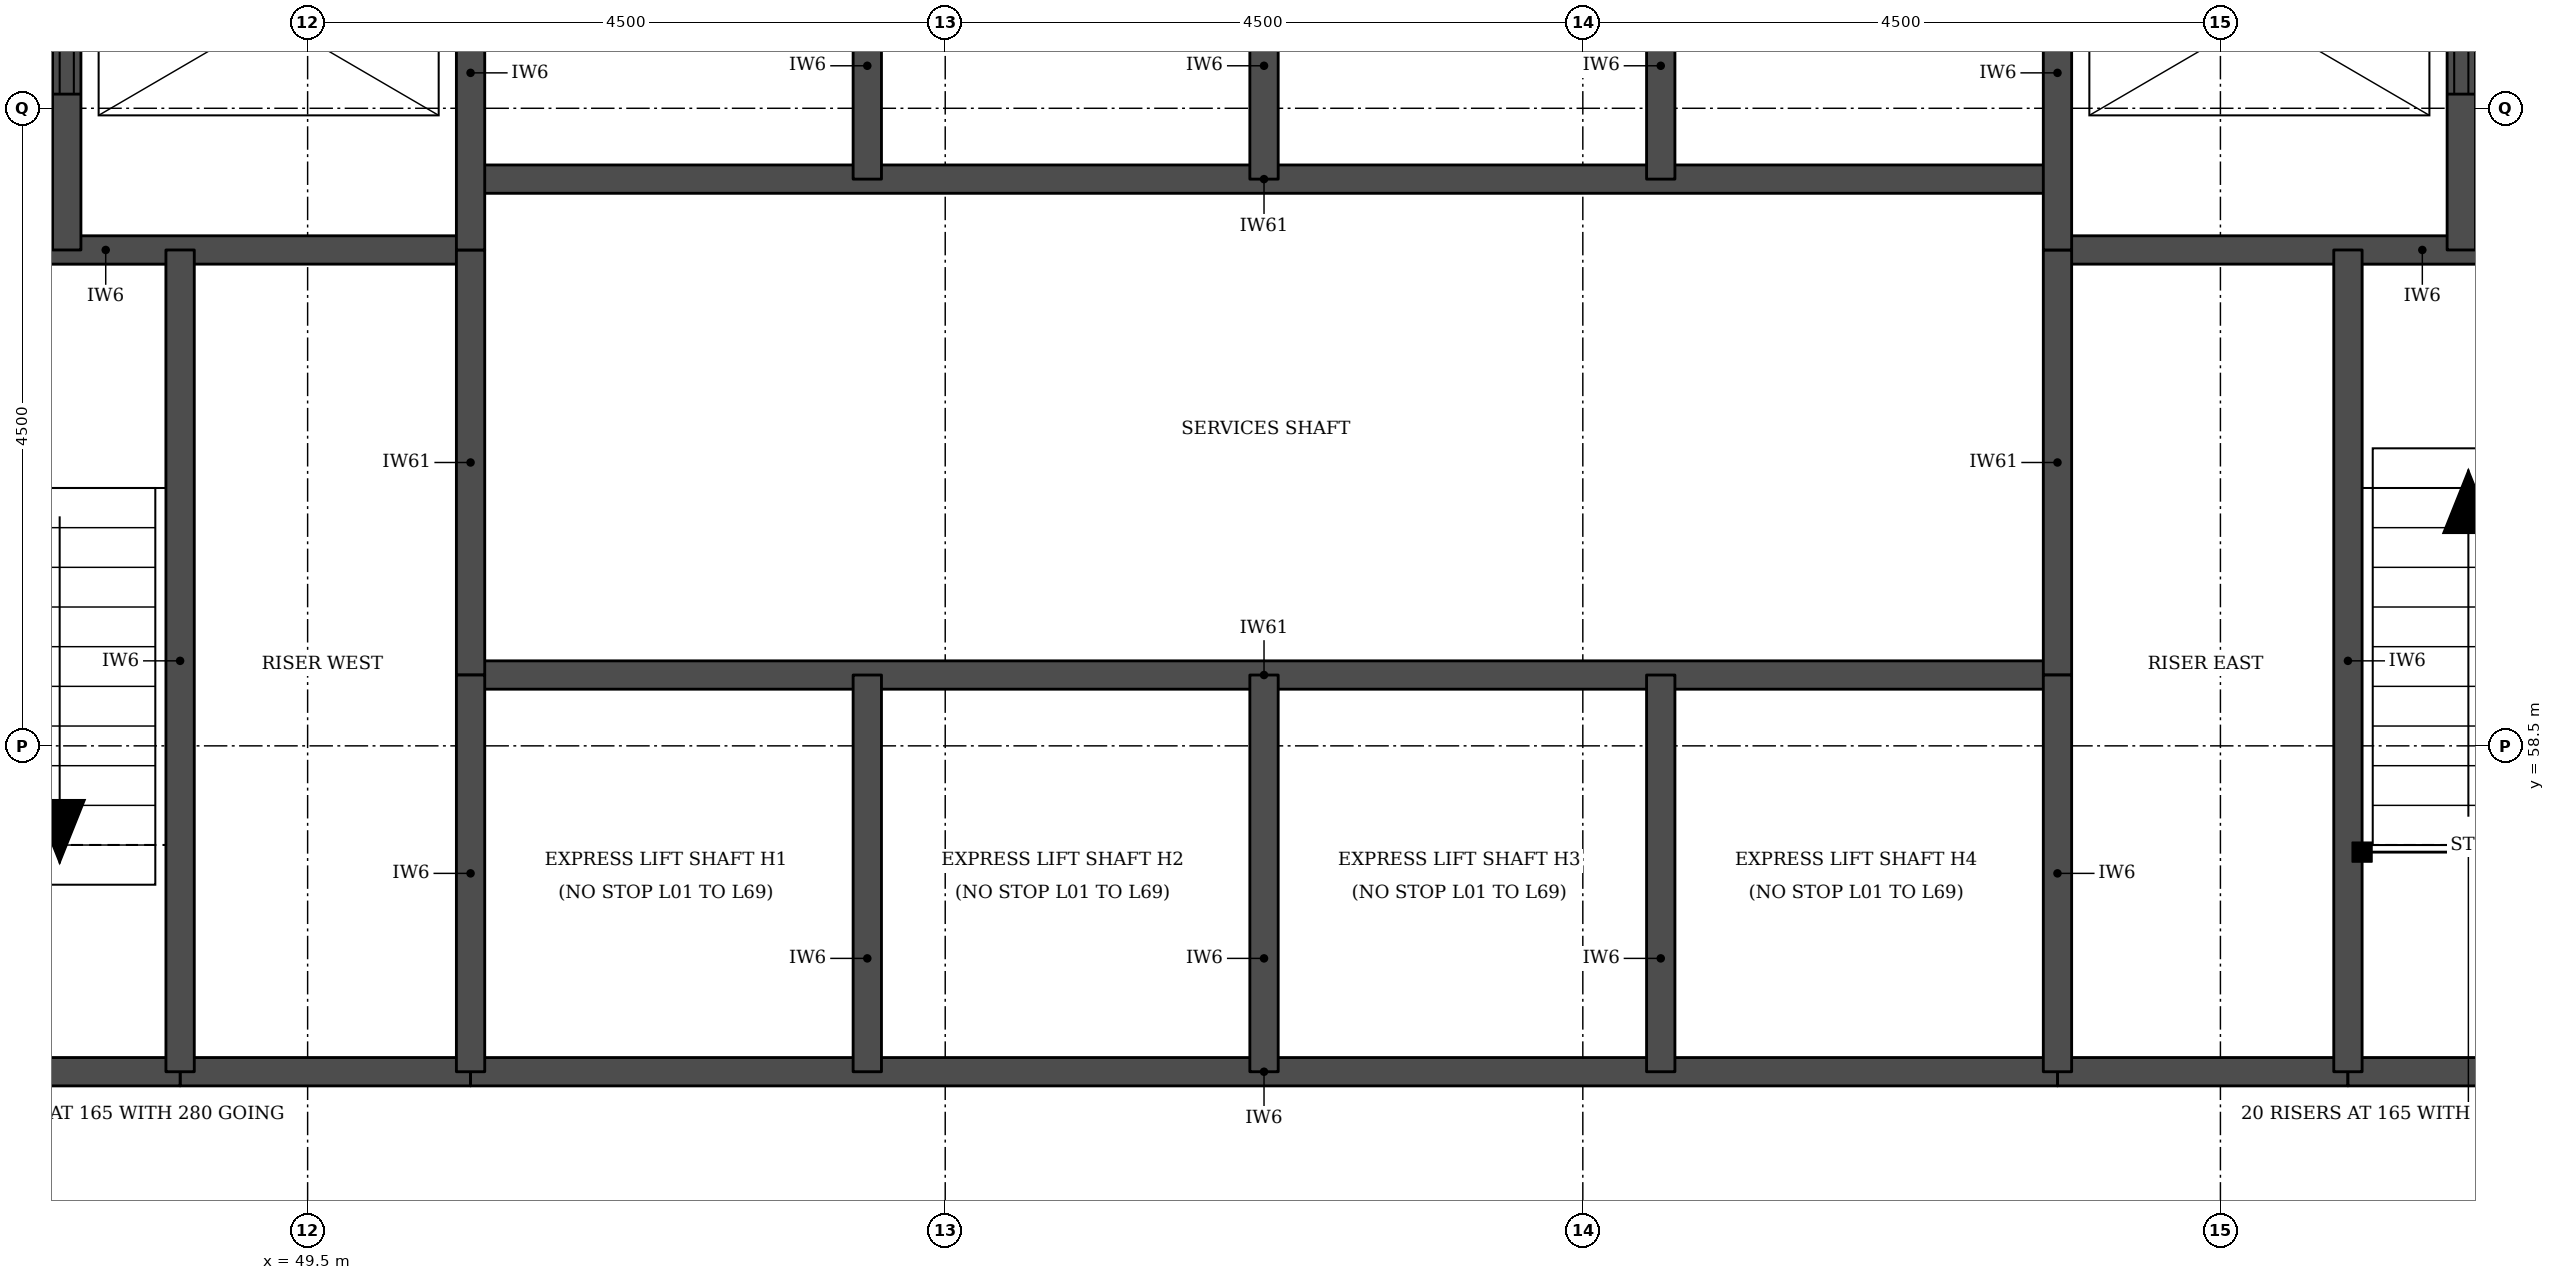
"""IFC4 building model, lengths in metres.
Left out: names, types, materials, properties, quantities, classifications, styles, units other than length and angle.
Written with IfcOpenShell. Run it as: python <this file> out.ifc"""

import sys

from ifc_helpers import new_model, si_unit, direction, frame, frame_2d, origin, place, context, subcontext, project, spatial, rectangle, extrude, element, fill, save


model = new_model("IFC4")
c1 = context("Model", 3, precision=1e-05, world=origin(), true_north=direction((0.0, 1.0)))
c2 = subcontext(c1, "Body", "Model", "MODEL_VIEW")
j1 = project(units=[si_unit("LENGTHUNIT", "METRE"), si_unit("PLANEANGLEUNIT", "RADIAN")], contexts=[c1])
p1 = place(None, origin())
s1 = spatial("IfcSite", under=j1, at=p1, CompositionType="ELEMENT")
p2 = place(p1, origin())
s2 = spatial("IfcBuilding", under=s1, at=p2, CompositionType="ELEMENT")
p3 = place(p2, frame((0.0, 0.0, 56.1)))
s3 = spatial("IfcBuildingStorey", under=s2, at=p3, CompositionType="ELEMENT", Elevation=56.1)
for number, where, z_axis, x_axis in (
    (1, (48.6, 56.2, 0.0), (0.0, 0.0, 1.0), (1.0, 0.0, 0.0)),
    (2, (61.85, 56.2, 0.0), (0.0, 0.0, 1.0), (1.0, 0.0, 0.0)),
):
    element("IfcWall", number, at=place(p3, frame(where, z_axis=z_axis, x_axis=x_axis)), inside=s3, PredefinedType="SOLIDWALL", context=c2, shape_type="SweptSolid", body=[
        extrude(rectangle(XDim=2.05, YDim=0.2, at=frame_2d((1.025, 0.0))), origin(), (0.0, 0.0, 1.0), 3.08),
    ])
p4 = place(p3, frame((45.5, 56.2, 0.0), z_axis=(0.0, 0.0, 1.0), x_axis=(1.0, 0.0, 0.0)))
e3 = element("IfcWall", 3, at=p4, inside=s3, PredefinedType="SOLIDWALL", context=c2, shape_type="SweptSolid", body=[
    extrude(rectangle(XDim=3.1, YDim=0.2, at=frame_2d((1.55, 0.0))), origin(), (0.0, 0.0, 1.0), 3.08),
])
p5 = place(p3, frame((50.65, 56.2, 0.0), z_axis=(0.0, 0.0, 1.0), x_axis=(1.0, 0.0, 0.0)))
e4 = element("IfcWall", 4, at=p5, inside=s3, PredefinedType="SOLIDWALL", context=c2, shape_type="SweptSolid", body=[
    extrude(rectangle(XDim=11.2, YDim=0.2, at=frame_2d((5.6, 0.0))), origin(), (0.0, 0.0, 1.0), 3.08),
])
p6 = place(p3, frame((63.9, 56.2, 0.0), z_axis=(0.0, 0.0, 1.0), x_axis=(1.0, 0.0, 0.0)))
e5 = element("IfcWall", 5, at=p6, inside=s3, PredefinedType="SOLIDWALL", context=c2, shape_type="SweptSolid", body=[
    extrude(rectangle(XDim=3.1, YDim=0.2, at=frame_2d((1.55, 0.0))), origin(), (0.0, 0.0, 1.0), 3.08),
])
p7 = place(p3, frame((50.65, 59.0, 0.0), z_axis=(0.0, 0.0, 1.0), x_axis=(1.0, 0.0, 0.0)))
e6 = element("IfcWall", 6, at=p7, inside=s3, PredefinedType="SOLIDWALL", context=c2, shape_type="SweptSolid", body=[
    extrude(rectangle(XDim=11.2, YDim=0.2, at=frame_2d((5.6, 0.0))), origin(), (0.0, 0.0, 1.0), 3.3),
])
for number, where, z_axis, x_axis in (
    (7, (45.5, 62.0, 0.0), (0.0, 0.0, 1.0), (1.0, 0.0, 0.0)),
    (8, (61.85, 62.0, 0.0), (0.0, 0.0, 1.0), (1.0, 0.0, 0.0)),
):
    element("IfcWall", number, at=place(p3, frame(where, z_axis=z_axis, x_axis=x_axis)), inside=s3, PredefinedType="SOLIDWALL", context=c2, shape_type="SweptSolid", body=[
        extrude(rectangle(XDim=5.15, YDim=0.2, at=frame_2d((2.575, 0.0))), origin(), (0.0, 0.0, 1.0), 3.08),
    ])
p8 = place(p3, frame((50.65, 62.5, 0.0), z_axis=(0.0, 0.0, 1.0), x_axis=(1.0, 0.0, 0.0)))
e9 = element("IfcWall", 9, at=p8, inside=s3, PredefinedType="SOLIDWALL", context=c2, shape_type="SweptSolid", body=[
    extrude(rectangle(XDim=11.2, YDim=0.2, at=frame_2d((5.6, 0.0))), origin(), (0.0, 0.0, 1.0), 3.3),
])
p9 = place(p3, frame((47.8, 62.0, 0.0), z_axis=(0.0, 0.0, 1.0), x_axis=(0.0, 1.0, 0.0)))
e10 = element("IfcWall", 10, at=p9, inside=s3, PredefinedType="SOLIDWALL", context=c2, shape_type="SweptSolid", body=[
    extrude(rectangle(XDim=3.3, YDim=0.2, at=frame_2d((1.65, 0.0))), origin(), (0.0, 0.0, 1.0), 3.08),
])
p10 = place(p9, frame((1.1, 0.0, 0.0)))
e11 = element("IfcOpeningElement", 11, at=p10, cuts=e10, PredefinedType="OPENING", context=c2, shape_type="SweptSolid", body=[
    extrude(rectangle(XDim=1.1, YDim=2.1, at=frame_2d((0.55, 1.05))), frame((0.0, 0.11, 0.0), z_axis=(0.0, -1.0, 0.0), x_axis=(1.0, 0.0, 0.0)), (0.0, 0.0, 1.0), 0.22),
])
p11 = place(p3, frame((48.6, 56.2, 0.0), z_axis=(0.0, 0.0, 1.0), x_axis=(0.0, 1.0, 0.0)))
e12 = element("IfcWall", 12, at=p11, inside=s3, PredefinedType="SOLIDWALL", context=c2, shape_type="SweptSolid", body=[
    extrude(rectangle(XDim=5.8, YDim=0.2, at=frame_2d((2.9, 0.0))), origin(), (0.0, 0.0, 1.0), 3.08),
])
p12 = place(p3, frame((50.65, 59.0, 0.0), z_axis=(0.0, 0.0, 1.0), x_axis=(0.0, 1.0, 0.0)))
e13 = element("IfcWall", 13, at=p12, inside=s3, PredefinedType="SOLIDWALL", context=c2, shape_type="SweptSolid", body=[
    extrude(rectangle(XDim=3.0, YDim=0.2, at=frame_2d((1.5, 0.0))), origin(), (0.0, 0.0, 1.0), 3.3),
])
p13 = place(p3, frame((50.65, 56.2, 0.0), z_axis=(0.0, 0.0, 1.0), x_axis=(0.0, 1.0, 0.0)))
e14 = element("IfcWall", 14, at=p13, inside=s3, PredefinedType="SOLIDWALL", context=c2, shape_type="SweptSolid", body=[
    extrude(rectangle(XDim=2.8, YDim=0.2, at=frame_2d((1.4, 0.0))), origin(), (0.0, 0.0, 1.0), 3.08),
])
p14 = place(p3, frame((50.65, 62.0, 0.0), z_axis=(0.0, 0.0, 1.0), x_axis=(0.0, 1.0, 0.0)))
e15 = element("IfcWall", 15, at=p14, inside=s3, PredefinedType="SOLIDWALL", context=c2, shape_type="SweptSolid", body=[
    extrude(rectangle(XDim=3.3, YDim=0.2, at=frame_2d((1.65, 0.0))), origin(), (0.0, 0.0, 1.0), 3.08),
])
for number, where, z_axis, x_axis in (
    (16, (53.45, 56.2, 0.0), (0.0, 0.0, 1.0), (0.0, 1.0, 0.0)),
    (17, (53.45, 62.5, 0.0), (0.0, 0.0, 1.0), (0.0, 1.0, 0.0)),
    (18, (56.25, 56.2, 0.0), (0.0, 0.0, 1.0), (0.0, 1.0, 0.0)),
    (19, (56.25, 62.5, 0.0), (0.0, 0.0, 1.0), (0.0, 1.0, 0.0)),
    (20, (59.05, 56.2, 0.0), (0.0, 0.0, 1.0), (0.0, 1.0, 0.0)),
    (21, (59.05, 62.5, 0.0), (0.0, 0.0, 1.0), (0.0, 1.0, 0.0)),
):
    element("IfcWall", number, at=place(p3, frame(where, z_axis=z_axis, x_axis=x_axis)), inside=s3, PredefinedType="SOLIDWALL", context=c2, shape_type="SweptSolid", body=[
        extrude(rectangle(XDim=2.8, YDim=0.2, at=frame_2d((1.4, 0.0))), origin(), (0.0, 0.0, 1.0), 3.08),
    ])
p15 = place(p3, frame((61.85, 59.0, 0.0), z_axis=(0.0, 0.0, 1.0), x_axis=(0.0, 1.0, 0.0)))
e22 = element("IfcWall", 22, at=p15, inside=s3, PredefinedType="SOLIDWALL", context=c2, shape_type="SweptSolid", body=[
    extrude(rectangle(XDim=3.0, YDim=0.2, at=frame_2d((1.5, 0.0))), origin(), (0.0, 0.0, 1.0), 3.3),
])
p16 = place(p3, frame((61.85, 56.2, 0.0), z_axis=(0.0, 0.0, 1.0), x_axis=(0.0, 1.0, 0.0)))
e23 = element("IfcWall", 23, at=p16, inside=s3, PredefinedType="SOLIDWALL", context=c2, shape_type="SweptSolid", body=[
    extrude(rectangle(XDim=2.8, YDim=0.2, at=frame_2d((1.4, 0.0))), origin(), (0.0, 0.0, 1.0), 3.08),
])
p17 = place(p3, frame((61.85, 62.0, 0.0), z_axis=(0.0, 0.0, 1.0), x_axis=(0.0, 1.0, 0.0)))
e24 = element("IfcWall", 24, at=p17, inside=s3, PredefinedType="SOLIDWALL", context=c2, shape_type="SweptSolid", body=[
    extrude(rectangle(XDim=3.3, YDim=0.2, at=frame_2d((1.65, 0.0))), origin(), (0.0, 0.0, 1.0), 3.08),
])
p18 = place(p3, frame((63.9, 56.2, 0.0), z_axis=(0.0, 0.0, 1.0), x_axis=(0.0, 1.0, 0.0)))
e25 = element("IfcWall", 25, at=p18, inside=s3, PredefinedType="SOLIDWALL", context=c2, shape_type="SweptSolid", body=[
    extrude(rectangle(XDim=5.8, YDim=0.2, at=frame_2d((2.9, 0.0))), origin(), (0.0, 0.0, 1.0), 3.08),
])
p19 = place(p3, frame((64.7, 62.0, 0.0), z_axis=(0.0, 0.0, 1.0), x_axis=(0.0, 1.0, 0.0)))
e26 = element("IfcWall", 26, at=p19, inside=s3, PredefinedType="SOLIDWALL", context=c2, shape_type="SweptSolid", body=[
    extrude(rectangle(XDim=3.3, YDim=0.2, at=frame_2d((1.65, 0.0))), origin(), (0.0, 0.0, 1.0), 3.08),
])
p20 = place(p19, frame((1.1, 0.0, 0.0)))
e27 = element("IfcOpeningElement", 27, at=p20, cuts=e26, PredefinedType="OPENING", context=c2, shape_type="SweptSolid", body=[
    extrude(rectangle(XDim=1.1, YDim=2.1, at=frame_2d((0.55, 1.05))), frame((0.0, 0.11, 0.0), z_axis=(0.0, -1.0, 0.0), x_axis=(1.0, 0.0, 0.0)), (0.0, 0.0, 1.0), 0.22),
])
p21 = place(p10, origin())
e28 = element("IfcDoor", 28, at=p21, inside=s3, OperationType="DOUBLE_DOOR_SLIDING", PredefinedType="DOOR", context=c2, shape_type="SweptSolid", body=[
    extrude(rectangle(XDim=1.1, YDim=2.1, at=frame_2d((0.55, 1.05))), frame((0.0, 0.025, 0.0), z_axis=(0.0, -1.0, 0.0), x_axis=(1.0, 0.0, 0.0)), (0.0, 0.0, 1.0), 0.05),
])
fill(e11, e28)
p22 = place(p20, origin())
e29 = element("IfcDoor", 29, at=p22, inside=s3, OperationType="DOUBLE_DOOR_SLIDING", PredefinedType="DOOR", context=c2, shape_type="SweptSolid", body=[
    extrude(rectangle(XDim=1.1, YDim=2.1, at=frame_2d((0.55, 1.05))), frame((0.0, 0.025, 0.0), z_axis=(0.0, -1.0, 0.0), x_axis=(1.0, 0.0, 0.0)), (0.0, 0.0, 1.0), 0.05),
])
fill(e27, e29)
save(model, sys.argv[1])
